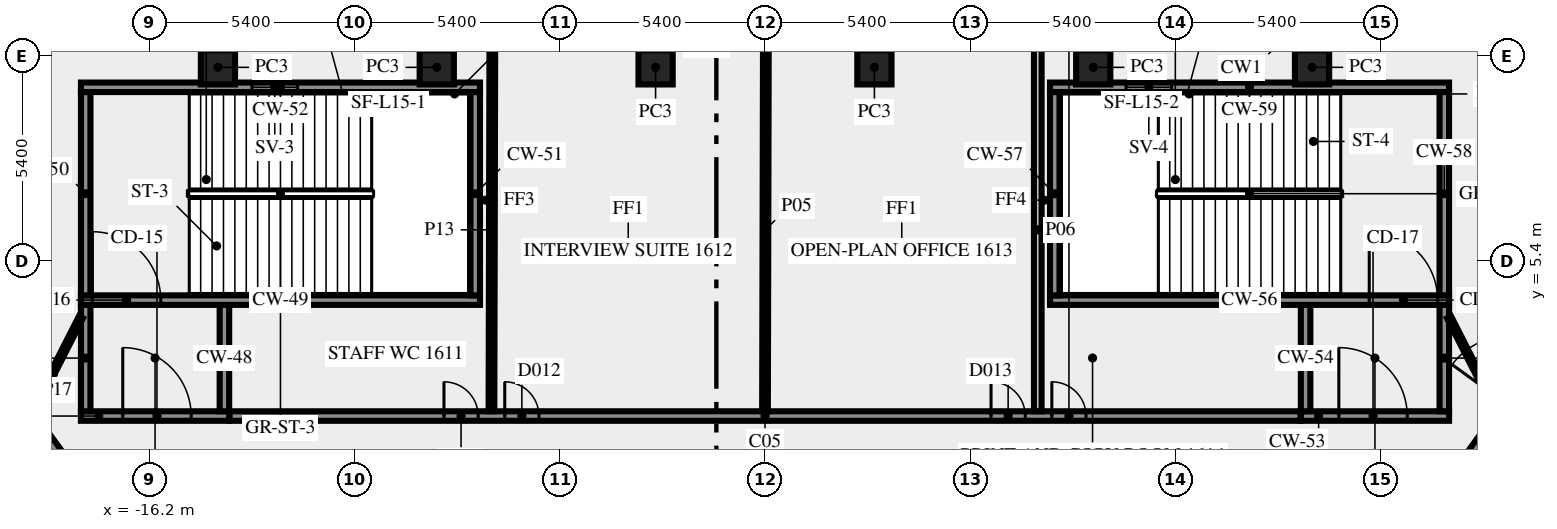
"""IFC4 building model, lengths in metres.
Left out: names, types, materials, properties, quantities, classifications, styles, units other than length and angle.
Written with IfcOpenShell. Run it as: python <this file> out.ifc"""

import sys

from ifc_helpers import new_model, si_unit, direction, frame, frame_2d, origin, origin_2d, place, context, subcontext, project, spatial, rectangle, extrude, element, fill, save


model = new_model("IFC4")
c1 = context("Model", 3, precision=1e-05, world=origin(), true_north=direction((0.0, 1.0)))
c2 = subcontext(c1, "Body", "Model", "MODEL_VIEW")
j1 = project(units=[si_unit("LENGTHUNIT", "METRE"), si_unit("PLANEANGLEUNIT", "RADIAN")], contexts=[c1])
p1 = place(None, origin())
s1 = spatial("IfcSite", under=j1, at=p1, CompositionType="ELEMENT")
p2 = place(p1, origin())
s2 = spatial("IfcBuilding", under=s1, at=p2, CompositionType="ELEMENT")
p3 = place(p2, frame((0.0, 0.0, 71.0)))
s3 = spatial("IfcBuildingStorey", under=s2, at=p3, CompositionType="ELEMENT", Elevation=71.0)
for number, where, z_axis, x_axis in (
    (1, (14.395, 10.5, 0.0), (0.0, 0.0, 1.0), (-1.0, 0.0, 0.0)),
    (2, (8.637, 10.5, 0.0), (0.0, 0.0, 1.0), (-1.0, 0.0, 0.0)),
    (3, (2.879, 10.5, 0.0), (0.0, 0.0, 1.0), (-1.0, 0.0, 0.0)),
    (4, (-2.879, 10.5, 0.0), (0.0, 0.0, 1.0), (-1.0, 0.0, 0.0)),
    (5, (-8.637, 10.5, 0.0), (0.0, 0.0, 1.0), (-1.0, 0.0, 0.0)),
    (6, (-14.395, 10.5, 0.0), (0.0, 0.0, 1.0), (-1.0, 0.0, 0.0)),
):
    element("IfcColumn", number, at=place(p3, frame(where, z_axis=z_axis, x_axis=x_axis)), inside=s3, PredefinedType="COLUMN", context=c2, shape_type="SweptSolid", body=[
        extrude(rectangle(XDim=0.9, YDim=0.9, at=origin_2d()), origin(), (0.0, 0.0, 1.0), 3.65),
    ])
p4 = place(p3, frame((-18.0, 1.325, 0.0), z_axis=(0.0, 0.0, 1.0), x_axis=(1.0, 0.0, 0.0)))
e7 = element("IfcWall", 7, at=p4, inside=s3, PredefinedType="SHEAR", context=c2, shape_type="SweptSolid", body=[
    extrude(rectangle(XDim=3.9, YDim=0.25, at=frame_2d((1.95, 0.0))), origin(), (0.0, 0.0, 1.0), 3.65),
])
p5 = place(p4, frame((1.1, 0.0, 0.0)))
e8 = element("IfcOpeningElement", 8, at=p5, cuts=e7, PredefinedType="OPENING", context=c2, shape_type="SweptSolid", body=[
    extrude(rectangle(XDim=1.8, YDim=2.1, at=frame_2d((0.9, 1.05))), frame((0.0, 0.135, 0.0), z_axis=(0.0, -1.0, 0.0), x_axis=(1.0, 0.0, 0.0)), (0.0, 0.0, 1.0), 0.27),
])
for number, where, z_axis, x_axis in (
    (9, (-17.875, 1.45, 0.0), (0.0, 0.0, 1.0), (0.0, 1.0, 0.0)),
    (10, (-14.225, 1.45, 0.0), (0.0, 0.0, 1.0), (0.0, 1.0, 0.0)),
):
    element("IfcWall", number, at=place(p3, frame(where, z_axis=z_axis, x_axis=x_axis)), inside=s3, PredefinedType="SHEAR", context=c2, shape_type="SweptSolid", body=[
        extrude(rectangle(XDim=2.8, YDim=0.25, at=frame_2d((1.4, 0.0))), origin(), (0.0, 0.0, 1.0), 3.65),
    ])
p6 = place(p3, frame((-18.0, 4.375, 0.0), z_axis=(0.0, 0.0, 1.0), x_axis=(1.0, 0.0, 0.0)))
e11 = element("IfcWall", 11, at=p6, inside=s3, PredefinedType="SHEAR", context=c2, shape_type="SweptSolid", body=[
    extrude(rectangle(XDim=10.5, YDim=0.25, at=frame_2d((5.25, 0.0))), origin(), (0.0, 0.0, 1.0), 3.65),
])
p7 = place(p6, frame((0.3, 0.0, 0.0)))
e12 = element("IfcOpeningElement", 12, at=p7, cuts=e11, PredefinedType="OPENING", context=c2, shape_type="SweptSolid", body=[
    extrude(rectangle(XDim=1.8, YDim=2.1, at=frame_2d((0.9, 1.05))), frame((0.0, 0.135, 0.0), z_axis=(0.0, -1.0, 0.0), x_axis=(1.0, 0.0, 0.0)), (0.0, 0.0, 1.0), 0.27),
])
for number, where, z_axis, x_axis in (
    (13, (-17.875, 4.5, 0.0), (0.0, 0.0, 1.0), (0.0, 1.0, 0.0)),
    (14, (-7.625, 4.5, 0.0), (0.0, 0.0, 1.0), (0.0, 1.0, 0.0)),
):
    element("IfcWall", number, at=place(p3, frame(where, z_axis=z_axis, x_axis=x_axis)), inside=s3, PredefinedType="SHEAR", context=c2, shape_type="SweptSolid", body=[
        extrude(rectangle(XDim=5.35, YDim=0.25, at=frame_2d((2.675, 0.0))), origin(), (0.0, 0.0, 1.0), 3.65),
    ])
p8 = place(p3, frame((-18.0, 9.975, 0.0), z_axis=(0.0, 0.0, 1.0), x_axis=(1.0, 0.0, 0.0)))
e15 = element("IfcWall", 15, at=p8, inside=s3, PredefinedType="SHEAR", context=c2, shape_type="SweptSolid", body=[
    extrude(rectangle(XDim=10.5, YDim=0.25, at=frame_2d((5.25, 0.0))), origin(), (0.0, 0.0, 1.0), 3.65),
])
p9 = place(p8, frame((4.5, 0.0, 1.0)))
e16 = element("IfcOpeningElement", 16, at=p9, cuts=e15, PredefinedType="OPENING", context=c2, shape_type="SweptSolid", body=[
    extrude(rectangle(XDim=1.2, YDim=1.2, at=frame_2d((0.6, 0.6))), frame((0.0, 0.135, 0.0), z_axis=(0.0, -1.0, 0.0), x_axis=(1.0, 0.0, 0.0)), (0.0, 0.0, 1.0), 0.27),
])
p10 = place(p3, frame((14.1, 1.325, 0.0), z_axis=(0.0, 0.0, 1.0), x_axis=(1.0, 0.0, 0.0)))
e17 = element("IfcWall", 17, at=p10, inside=s3, PredefinedType="SHEAR", context=c2, shape_type="SweptSolid", body=[
    extrude(rectangle(XDim=3.9, YDim=0.25, at=frame_2d((1.95, 0.0))), origin(), (0.0, 0.0, 1.0), 3.65),
])
p11 = place(p10, frame((1.0, 0.0, 0.0)))
e18 = element("IfcOpeningElement", 18, at=p11, cuts=e17, PredefinedType="OPENING", context=c2, shape_type="SweptSolid", body=[
    extrude(rectangle(XDim=1.8, YDim=2.1, at=frame_2d((0.9, 1.05))), frame((0.0, 0.135, 0.0), z_axis=(0.0, -1.0, 0.0), x_axis=(1.0, 0.0, 0.0)), (0.0, 0.0, 1.0), 0.27),
])
for number, where, z_axis, x_axis in (
    (19, (14.225, 1.45, 0.0), (0.0, 0.0, 1.0), (0.0, 1.0, 0.0)),
    (20, (17.875, 1.45, 0.0), (0.0, 0.0, 1.0), (0.0, 1.0, 0.0)),
):
    element("IfcWall", number, at=place(p3, frame(where, z_axis=z_axis, x_axis=x_axis)), inside=s3, PredefinedType="SHEAR", context=c2, shape_type="SweptSolid", body=[
        extrude(rectangle(XDim=2.8, YDim=0.25, at=frame_2d((1.4, 0.0))), origin(), (0.0, 0.0, 1.0), 3.65),
    ])
p12 = place(p3, frame((7.5, 4.375, 0.0), z_axis=(0.0, 0.0, 1.0), x_axis=(1.0, 0.0, 0.0)))
e21 = element("IfcWall", 21, at=p12, inside=s3, PredefinedType="SHEAR", context=c2, shape_type="SweptSolid", body=[
    extrude(rectangle(XDim=10.5, YDim=0.25, at=frame_2d((5.25, 0.0))), origin(), (0.0, 0.0, 1.0), 3.65),
])
p13 = place(p12, frame((8.4, 0.0, 0.0)))
e22 = element("IfcOpeningElement", 22, at=p13, cuts=e21, PredefinedType="OPENING", context=c2, shape_type="SweptSolid", body=[
    extrude(rectangle(XDim=1.8, YDim=2.1, at=frame_2d((0.9, 1.05))), frame((0.0, 0.135, 0.0), z_axis=(0.0, -1.0, 0.0), x_axis=(1.0, 0.0, 0.0)), (0.0, 0.0, 1.0), 0.27),
])
for number, where, z_axis, x_axis in (
    (23, (7.625, 4.5, 0.0), (0.0, 0.0, 1.0), (0.0, 1.0, 0.0)),
    (24, (17.875, 4.5, 0.0), (0.0, 0.0, 1.0), (0.0, 1.0, 0.0)),
):
    element("IfcWall", number, at=place(p3, frame(where, z_axis=z_axis, x_axis=x_axis)), inside=s3, PredefinedType="SHEAR", context=c2, shape_type="SweptSolid", body=[
        extrude(rectangle(XDim=5.35, YDim=0.25, at=frame_2d((2.675, 0.0))), origin(), (0.0, 0.0, 1.0), 3.65),
    ])
p14 = place(p3, frame((7.5, 9.975, 0.0), z_axis=(0.0, 0.0, 1.0), x_axis=(1.0, 0.0, 0.0)))
e25 = element("IfcWall", 25, at=p14, inside=s3, PredefinedType="SHEAR", context=c2, shape_type="SweptSolid", body=[
    extrude(rectangle(XDim=10.5, YDim=0.25, at=frame_2d((5.25, 0.0))), origin(), (0.0, 0.0, 1.0), 3.65),
])
p15 = place(p14, frame((2.0, 0.0, 1.0)))
e26 = element("IfcOpeningElement", 26, at=p15, cuts=e25, PredefinedType="OPENING", context=c2, shape_type="SweptSolid", body=[
    extrude(rectangle(XDim=1.2, YDim=1.2, at=frame_2d((0.6, 0.6))), frame((0.0, 0.135, 0.0), z_axis=(0.0, -1.0, 0.0), x_axis=(1.0, 0.0, 0.0)), (0.0, 0.0, 1.0), 0.27),
])
p16 = place(p3, frame((-37.232, 25.972, 0.0), z_axis=(0.0, 0.0, 1.0), x_axis=(0.587786323093, -0.809016216391, 0.0)))
e27 = element("IfcWall", 27, at=p16, inside=s3, PredefinedType="SOLIDWALL", context=c2, shape_type="SweptSolid", body=[
    extrude(rectangle(XDim=33.493, YDim=0.25, at=frame_2d((16.747, 0.0))), origin(), (0.0, 0.0, 1.0), 3.65),
])
p17 = place(p16, frame((16.435, 0.0, 0.0)))
e28 = element("IfcOpeningElement", 28, at=p17, cuts=e27, PredefinedType="OPENING", context=c2, shape_type="SweptSolid", body=[
    extrude(rectangle(XDim=0.9, YDim=2.1, at=frame_2d((0.45, 1.05))), frame((0.0, 0.135, 0.0), z_axis=(0.0, -1.0, 0.0), x_axis=(1.0, 0.0, 0.0)), (0.0, 0.0, 1.0), 0.27),
])
p18 = place(p16, frame((7.137, 0.0, 0.0)))
e29 = element("IfcOpeningElement", 29, at=p18, cuts=e27, PredefinedType="OPENING", context=c2, shape_type="SweptSolid", body=[
    extrude(rectangle(XDim=1.8, YDim=2.1, at=frame_2d((0.9, 1.05))), frame((0.0, 0.135, 0.0), z_axis=(0.0, -1.0, 0.0), x_axis=(1.0, 0.0, 0.0)), (0.0, 0.0, 1.0), 0.27),
])
p19 = place(p3, frame((-14.09, 1.325, 0.0), z_axis=(0.0, 0.0, 1.0), x_axis=(1.0, 0.0, 0.0)))
e30 = element("IfcWall", 30, at=p19, inside=s3, PredefinedType="SOLIDWALL", context=c2, shape_type="SweptSolid", body=[
    extrude(rectangle(XDim=28.18, YDim=0.25, at=frame_2d((14.09, 0.0))), origin(), (0.0, 0.0, 1.0), 3.65),
])
p20 = place(p19, frame((20.038, 0.0, 0.0)))
e31 = element("IfcOpeningElement", 31, at=p20, cuts=e30, PredefinedType="OPENING", context=c2, shape_type="SweptSolid", body=[
    extrude(rectangle(XDim=0.9, YDim=2.1, at=frame_2d((0.45, 1.05))), frame((0.0, 0.135, 0.0), z_axis=(0.0, -1.0, 0.0), x_axis=(1.0, 0.0, 0.0)), (0.0, 0.0, 1.0), 0.27),
])
p21 = place(p19, frame((7.242, 0.0, 0.0)))
e32 = element("IfcOpeningElement", 32, at=p21, cuts=e30, PredefinedType="OPENING", context=c2, shape_type="SweptSolid", body=[
    extrude(rectangle(XDim=0.9, YDim=2.1, at=frame_2d((0.45, 1.05))), frame((0.0, 0.135, 0.0), z_axis=(0.0, -1.0, 0.0), x_axis=(1.0, 0.0, 0.0)), (0.0, 0.0, 1.0), 0.27),
])
p22 = place(p19, frame((21.638, 0.0, 0.0)))
e33 = element("IfcOpeningElement", 33, at=p22, cuts=e30, PredefinedType="OPENING", context=c2, shape_type="SweptSolid", body=[
    extrude(rectangle(XDim=0.9, YDim=2.1, at=frame_2d((0.45, 1.05))), frame((0.0, 0.135, 0.0), z_axis=(0.0, -1.0, 0.0), x_axis=(1.0, 0.0, 0.0)), (0.0, 0.0, 1.0), 0.27),
])
p23 = place(p19, frame((5.642, 0.0, 0.0)))
e34 = element("IfcOpeningElement", 34, at=p23, cuts=e30, PredefinedType="OPENING", context=c2, shape_type="SweptSolid", body=[
    extrude(rectangle(XDim=0.9, YDim=2.1, at=frame_2d((0.45, 1.05))), frame((0.0, 0.135, 0.0), z_axis=(0.0, -1.0, 0.0), x_axis=(1.0, 0.0, 0.0)), (0.0, 0.0, 1.0), 0.27),
])
p24 = place(p3, frame((17.545, -1.125, 0.0), z_axis=(0.0, 0.0, 1.0), x_axis=(0.587786323093, 0.809016216391, 0.0)))
e35 = element("IfcWall", 35, at=p24, inside=s3, PredefinedType="SOLIDWALL", context=c2, shape_type="SweptSolid", body=[
    extrude(rectangle(XDim=33.493, YDim=0.25, at=frame_2d((16.747, 0.0))), origin(), (0.0, 0.0, 1.0), 3.65),
])
p25 = place(p24, frame((27.458, 0.0, 0.0)))
e36 = element("IfcOpeningElement", 36, at=p25, cuts=e35, PredefinedType="OPENING", context=c2, shape_type="SweptSolid", body=[
    extrude(rectangle(XDim=1.8, YDim=2.1, at=frame_2d((0.9, 1.05))), frame((0.0, 0.135, 0.0), z_axis=(0.0, -1.0, 0.0), x_axis=(1.0, 0.0, 0.0)), (0.0, 0.0, 1.0), 0.27),
])
p26 = place(p24, frame((3.392, 0.0, 0.0)))
e37 = element("IfcOpeningElement", 37, at=p26, cuts=e35, PredefinedType="OPENING", context=c2, shape_type="SweptSolid", body=[
    extrude(rectangle(XDim=1.8, YDim=2.1, at=frame_2d((0.9, 1.05))), frame((0.0, 0.135, 0.0), z_axis=(0.0, -1.0, 0.0), x_axis=(1.0, 0.0, 0.0)), (0.0, 0.0, 1.0), 0.27),
])
p27 = place(p24, frame((32.253, 0.0, 0.0)))
e38 = element("IfcOpeningElement", 38, at=p27, cuts=e35, PredefinedType="OPENING", context=c2, shape_type="SweptSolid", body=[
    extrude(rectangle(XDim=0.9, YDim=2.1, at=frame_2d((0.45, 1.05))), frame((0.0, 0.135, 0.0), z_axis=(0.0, -1.0, 0.0), x_axis=(1.0, 0.0, 0.0)), (0.0, 0.0, 1.0), 0.27),
])
p28 = place(p3, frame((0.023, 11.0, 0.0), z_axis=(0.0, 0.0, 1.0), x_axis=(-0.002377476217, -0.999997173799, 0.0)))
e39 = element("IfcWall", 39, at=p28, inside=s3, PredefinedType="PARTITIONING", context=c2, shape_type="SweptSolid", body=[
    extrude(rectangle(XDim=9.55, YDim=0.15, at=frame_2d((4.775, 0.0))), origin(), (0.0, 0.0, 1.0), 2.75),
])
p29 = place(p3, frame((7.178, 1.45, 0.0), z_axis=(0.0, 0.0, 1.0), x_axis=(0.0, 1.0, 0.0)))
e40 = element("IfcWall", 40, at=p29, inside=s3, PredefinedType="SOLIDWALL", context=c2, shape_type="SweptSolid", body=[
    extrude(rectangle(XDim=9.55, YDim=0.2, at=frame_2d((4.775, 0.0))), origin(), (0.0, 0.0, 1.0), 2.75),
])
p30 = place(p3, frame((-7.175, 11.0, 0.0), z_axis=(0.0, 0.0, 1.0), x_axis=(-0.002377476217, -0.999997173799, 0.0)))
e41 = element("IfcWall", 41, at=p30, inside=s3, PredefinedType="PARTITIONING", context=c2, shape_type="SweptSolid", body=[
    extrude(rectangle(XDim=9.55, YDim=0.15, at=frame_2d((4.775, 0.0))), origin(), (0.0, 0.0, 1.0), 2.75),
])
for number, where, z_axis, x_axis in (
    (42, (-19.261, 1.45, 0.0), (0.0, 0.0, 1.0), (0.454, 0.891, 0.0)),
    (43, (18.0, 3.925, 0.0), (0.0, 0.0, 1.0), (0.454, -0.891, 0.0)),
):
    element("IfcWall", number, at=place(p3, frame(where, z_axis=z_axis, x_axis=x_axis)), inside=s3, PredefinedType="PARTITIONING", context=c2, shape_type="SweptSolid", body=[
        extrude(rectangle(XDim=2.778, YDim=0.12, at=frame_2d((1.389, 0.0))), origin(), (0.0, 0.0, 1.0), 3.65),
    ])
p31 = place(p5, origin())
e44 = element("IfcDoor", 44, at=p31, inside=s3, OperationType="DOUBLE_DOOR_SINGLE_SWING", PredefinedType="DOOR", context=c2, shape_type="SweptSolid", body=[
    extrude(rectangle(XDim=1.8, YDim=2.1, at=frame_2d((0.9, 1.05))), frame((0.0, 0.025, 0.0), z_axis=(0.0, -1.0, 0.0), x_axis=(1.0, 0.0, 0.0)), (0.0, 0.0, 1.0), 0.05),
])
fill(e8, e44)
p32 = place(p7, origin())
e45 = element("IfcDoor", 45, at=p32, inside=s3, OperationType="DOUBLE_DOOR_SINGLE_SWING", PredefinedType="DOOR", context=c2, shape_type="SweptSolid", body=[
    extrude(rectangle(XDim=1.8, YDim=2.1, at=frame_2d((0.9, 1.05))), frame((0.0, 0.025, 0.0), z_axis=(0.0, -1.0, 0.0), x_axis=(1.0, 0.0, 0.0)), (0.0, 0.0, 1.0), 0.05),
])
fill(e12, e45)
p33 = place(p9, origin())
e46 = element("IfcWindow", 46, at=p33, inside=s3, PartitioningType="SINGLE_PANEL", PredefinedType="WINDOW", context=c2, shape_type="SweptSolid", body=[
    extrude(rectangle(XDim=1.2, YDim=1.2, at=frame_2d((0.6, 0.6))), frame((0.0, 0.03, 0.0), z_axis=(0.0, -1.0, 0.0), x_axis=(1.0, 0.0, 0.0)), (0.0, 0.0, 1.0), 0.06),
])
fill(e16, e46)
p34 = place(p11, origin())
e47 = element("IfcDoor", 47, at=p34, inside=s3, OperationType="DOUBLE_DOOR_SINGLE_SWING", PredefinedType="DOOR", context=c2, shape_type="SweptSolid", body=[
    extrude(rectangle(XDim=1.8, YDim=2.1, at=frame_2d((0.9, 1.05))), frame((0.0, 0.025, 0.0), z_axis=(0.0, -1.0, 0.0), x_axis=(1.0, 0.0, 0.0)), (0.0, 0.0, 1.0), 0.05),
])
fill(e18, e47)
p35 = place(p13, origin())
e48 = element("IfcDoor", 48, at=p35, inside=s3, OperationType="DOUBLE_DOOR_SINGLE_SWING", PredefinedType="DOOR", context=c2, shape_type="SweptSolid", body=[
    extrude(rectangle(XDim=1.8, YDim=2.1, at=frame_2d((0.9, 1.05))), frame((0.0, 0.025, 0.0), z_axis=(0.0, -1.0, 0.0), x_axis=(1.0, 0.0, 0.0)), (0.0, 0.0, 1.0), 0.05),
])
fill(e22, e48)
p36 = place(p15, origin())
e49 = element("IfcWindow", 49, at=p36, inside=s3, PartitioningType="SINGLE_PANEL", PredefinedType="WINDOW", context=c2, shape_type="SweptSolid", body=[
    extrude(rectangle(XDim=1.2, YDim=1.2, at=frame_2d((0.6, 0.6))), frame((0.0, 0.03, 0.0), z_axis=(0.0, -1.0, 0.0), x_axis=(1.0, 0.0, 0.0)), (0.0, 0.0, 1.0), 0.06),
])
fill(e26, e49)
p37 = place(p20, origin())
e50 = element("IfcDoor", 50, at=p37, inside=s3, OperationType="SINGLE_SWING_RIGHT", PredefinedType="DOOR", context=c2, shape_type="SweptSolid", body=[
    extrude(rectangle(XDim=0.9, YDim=2.1, at=frame_2d((0.45, 1.05))), frame((0.0, 0.025, 0.0), z_axis=(0.0, -1.0, 0.0), x_axis=(1.0, 0.0, 0.0)), (0.0, 0.0, 1.0), 0.05),
])
fill(e31, e50)
p38 = place(p21, origin())
e51 = element("IfcDoor", 51, at=p38, inside=s3, OperationType="SINGLE_SWING_LEFT", PredefinedType="DOOR", context=c2, shape_type="SweptSolid", body=[
    extrude(rectangle(XDim=0.9, YDim=2.1, at=frame_2d((0.45, 1.05))), frame((0.0, 0.025, 0.0), z_axis=(0.0, -1.0, 0.0), x_axis=(1.0, 0.0, 0.0)), (0.0, 0.0, 1.0), 0.05),
])
fill(e32, e51)
p39 = place(p22, origin())
e52 = element("IfcDoor", 52, at=p39, inside=s3, OperationType="SINGLE_SWING_LEFT", PredefinedType="DOOR", context=c2, shape_type="SweptSolid", body=[
    extrude(rectangle(XDim=0.9, YDim=2.1, at=frame_2d((0.45, 1.05))), frame((0.0, 0.025, 0.0), z_axis=(0.0, -1.0, 0.0), x_axis=(1.0, 0.0, 0.0)), (0.0, 0.0, 1.0), 0.05),
])
fill(e33, e52)
p40 = place(p23, origin())
e53 = element("IfcDoor", 53, at=p40, inside=s3, OperationType="SINGLE_SWING_RIGHT", PredefinedType="DOOR", context=c2, shape_type="SweptSolid", body=[
    extrude(rectangle(XDim=0.9, YDim=2.1, at=frame_2d((0.45, 1.05))), frame((0.0, 0.025, 0.0), z_axis=(0.0, -1.0, 0.0), x_axis=(1.0, 0.0, 0.0)), (0.0, 0.0, 1.0), 0.05),
])
fill(e34, e53)
save(model, sys.argv[1])
